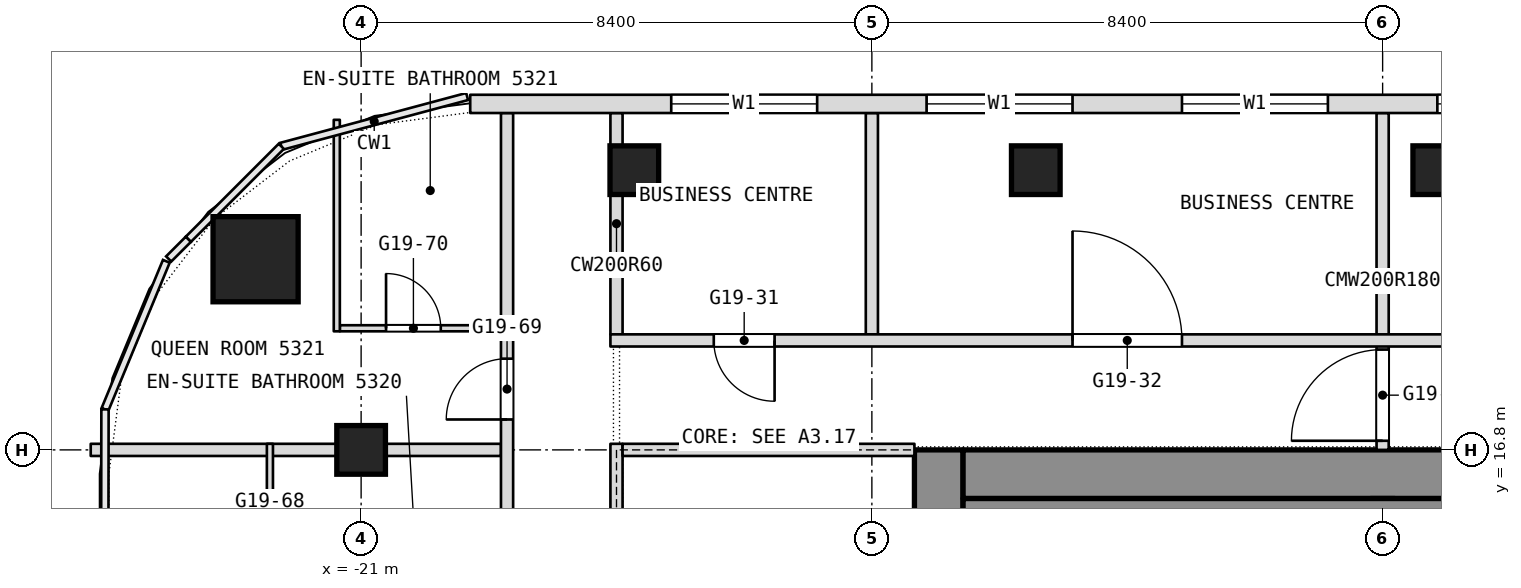
"""IFC4 building model, lengths in metres.
Left out: names, types, materials, properties, quantities, classifications, styles, units other than length and angle.
Written with IfcOpenShell. Run it as: python <this file> out.ifc"""

import sys

from ifc_helpers import new_model, si_unit, direction, frame, frame_2d, origin, origin_2d, place, context, subcontext, project, spatial, rectangle, extrude, element, fill, save


model = new_model("IFC4")
c1 = context("Model", 3, precision=1e-05, world=origin(), true_north=direction((0.0, 1.0)))
c2 = subcontext(c1, "Body", "Model", "MODEL_VIEW")
j1 = project(units=[si_unit("LENGTHUNIT", "METRE"), si_unit("PLANEANGLEUNIT", "RADIAN")], contexts=[c1])
p1 = place(None, origin())
s1 = spatial("IfcSite", under=j1, at=p1, CompositionType="ELEMENT")
p2 = place(p1, origin())
s2 = spatial("IfcBuilding", under=s1, at=p2, CompositionType="ELEMENT")
p3 = place(p2, frame((0.0, 0.0, 227.3)))
s3 = spatial("IfcBuildingStorey", under=s2, at=p3, CompositionType="ELEMENT", Elevation=227.3)
p4 = place(p3, frame((-11.5, 0.0, 0.0), z_axis=(0.0, 0.0, 1.0), x_axis=(0.0, 1.0, 0.0)))
e1 = element("IfcWall", 1, at=p4, inside=s3, PredefinedType="SHEAR", context=c2, shape_type="SweptSolid", body=[
    extrude(rectangle(XDim=16.8, YDim=0.8, at=frame_2d((8.4, 0.0))), origin(), (0.0, 0.0, 1.0), 3.6),
])
p5 = place(p4, frame((1.688, 0.0, 0.0)))
e2 = element("IfcOpeningElement", 2, at=p5, cuts=e1, PredefinedType="OPENING", context=c2, shape_type="SweptSolid", body=[
    extrude(rectangle(XDim=0.9, YDim=2.1, at=frame_2d((0.45, 1.05))), frame((0.0, 0.4, 0.0), z_axis=(0.0, -1.0, 0.0), x_axis=(1.0, 0.0, 0.0)), (0.0, 0.0, 1.0), 0.8),
])
p6 = place(p4, frame((4.312, 0.0, 0.0)))
e3 = element("IfcOpeningElement", 3, at=p6, cuts=e1, PredefinedType="OPENING", context=c2, shape_type="SweptSolid", body=[
    extrude(rectangle(XDim=0.9, YDim=2.1, at=frame_2d((0.45, 1.05))), frame((0.0, 0.4, 0.0), z_axis=(0.0, -1.0, 0.0), x_axis=(1.0, 0.0, 0.0)), (0.0, 0.0, 1.0), 0.8),
])
p7 = place(p4, frame((6.825, 0.0, 0.0)))
e4 = element("IfcOpeningElement", 4, at=p7, cuts=e1, PredefinedType="OPENING", context=c2, shape_type="SweptSolid", body=[
    extrude(rectangle(XDim=1.2, YDim=2.1, at=frame_2d((0.6, 1.05))), frame((0.0, 0.4, 0.0), z_axis=(0.0, -1.0, 0.0), x_axis=(1.0, 0.0, 0.0)), (0.0, 0.0, 1.0), 0.8),
])
p8 = place(p4, frame((12.3, 0.0, 0.0)))
e5 = element("IfcOpeningElement", 5, at=p8, cuts=e1, PredefinedType="OPENING", context=c2, shape_type="SweptSolid", body=[
    extrude(rectangle(XDim=0.9, YDim=2.1, at=frame_2d((0.45, 1.05))), frame((0.0, 0.4, 0.0), z_axis=(0.0, -1.0, 0.0), x_axis=(1.0, 0.0, 0.0)), (0.0, 0.0, 1.0), 0.8),
])
p9 = place(p4, frame((8.775, 0.0, 0.0)))
e6 = element("IfcOpeningElement", 6, at=p9, cuts=e1, PredefinedType="OPENING", context=c2, shape_type="SweptSolid", body=[
    extrude(rectangle(XDim=1.2, YDim=2.1, at=frame_2d((0.6, 1.05))), frame((0.0, 0.4, 0.0), z_axis=(0.0, -1.0, 0.0), x_axis=(1.0, 0.0, 0.0)), (0.0, 0.0, 1.0), 0.8),
])
p10 = place(p3, frame((-11.1, 16.4, 0.0), z_axis=(0.0, 0.0, 1.0), x_axis=(1.0, 0.0, 0.0)))
e7 = element("IfcWall", 7, at=p10, inside=s3, PredefinedType="SHEAR", context=c2, shape_type="SweptSolid", body=[
    extrude(rectangle(XDim=22.2, YDim=0.8, at=frame_2d((11.1, 0.0))), origin(), (0.0, 0.0, 1.0), 3.6),
])
p11 = place(p3, frame((-4.2, 0.8, 0.0), z_axis=(0.0, 0.0, 1.0), x_axis=(0.0, 1.0, 0.0)))
e8 = element("IfcWall", 8, at=p11, inside=s3, PredefinedType="SHEAR", context=c2, shape_type="SweptSolid", body=[
    extrude(rectangle(XDim=15.2, YDim=0.4, at=frame_2d((7.6, 0.0))), origin(), (0.0, 0.0, 1.0), 3.6),
])
p12 = place(p11, frame((8.5, 0.0, 0.0)))
e9 = element("IfcOpeningElement", 9, at=p12, cuts=e8, PredefinedType="OPENING", context=c2, shape_type="SweptSolid", body=[
    extrude(rectangle(XDim=1.2, YDim=2.1, at=frame_2d((0.6, 1.05))), frame((0.0, 0.2, 0.0), z_axis=(0.0, -1.0, 0.0), x_axis=(1.0, 0.0, 0.0)), (0.0, 0.0, 1.0), 0.4),
])
p13 = place(p3, frame((-22.736, 19.936, 0.0), z_axis=(0.0, 0.0, 1.0), x_axis=(1.0, 0.0, 0.0)))
e10 = element("IfcColumn", 10, at=p13, inside=s3, PredefinedType="COLUMN", context=c2, shape_type="SweptSolid", body=[
    extrude(rectangle(XDim=1.4, YDim=1.4, at=origin_2d()), origin(), (0.0, 0.0, 1.0), 3.6),
])
for number, where, z_axis, x_axis in (
    (11, (-21.0, 16.8, 0.0), (0.0, 0.0, 1.0), (1.0, 0.0, 0.0)),
    (12, (-16.507, 21.4, 0.0), (0.0, 0.0, 1.0), (1.0, 0.0, 0.0)),
    (13, (-9.904, 21.4, 0.0), (0.0, 0.0, 1.0), (1.0, 0.0, 0.0)),
    (14, (-3.302, 21.4, 0.0), (0.0, 0.0, 1.0), (1.0, 0.0, 0.0)),
):
    element("IfcColumn", number, at=place(p3, frame(where, z_axis=z_axis, x_axis=x_axis)), inside=s3, PredefinedType="COLUMN", context=c2, shape_type="SweptSolid", body=[
        extrude(rectangle(XDim=0.8, YDim=0.8, at=origin_2d()), origin(), (0.0, 0.0, 1.0), 3.6),
    ])
p14 = place(p3, frame((-4.2, 16.8, 0.0), z_axis=(0.0, 0.0, 1.0), x_axis=(0.0, 1.0, 0.0)))
e15 = element("IfcWall", 15, at=p14, inside=s3, PredefinedType="PARTITIONING", context=c2, shape_type="SweptSolid", body=[
    extrude(rectangle(XDim=5.54, YDim=0.2, at=frame_2d((2.77, 0.0))), origin(), (0.0, 0.0, 1.0), 3.34),
])
p15 = place(p14, frame((0.15, 0.0, 0.0)))
e16 = element("IfcOpeningElement", 16, at=p15, cuts=e15, PredefinedType="OPENING", context=c2, shape_type="SweptSolid", body=[
    extrude(rectangle(XDim=1.5, YDim=2.1, at=frame_2d((0.75, 1.05))), frame((0.0, 0.1, 0.0), z_axis=(0.0, -1.0, 0.0), x_axis=(1.0, 0.0, 0.0)), (0.0, 0.0, 1.0), 0.2),
])
for number, where, z_axis, x_axis in (
    (17, (-12.6, 18.7, 0.0), (0.0, 0.0, 1.0), (0.0, 1.0, 0.0)),
    (18, (-16.8, 18.7, 0.0), (0.0, 0.0, 1.0), (0.0, 1.0, 0.0)),
):
    element("IfcWall", number, at=place(p3, frame(where, z_axis=z_axis, x_axis=x_axis)), inside=s3, PredefinedType="PARTITIONING", context=c2, shape_type="SweptSolid", body=[
        extrude(rectangle(XDim=3.64, YDim=0.2, at=frame_2d((1.82, 0.0))), origin(), (0.0, 0.0, 1.0), 3.34),
    ])
p16 = place(p3, frame((-25.447, 16.8, 0.0), z_axis=(0.0, 0.0, 1.0), x_axis=(1.0, 0.0, 0.0)))
e19 = element("IfcWall", 19, at=p16, inside=s3, PredefinedType="PARTITIONING", context=c2, shape_type="SweptSolid", body=[
    extrude(rectangle(XDim=6.747, YDim=0.2, at=frame_2d((3.374, 0.0))), origin(), (0.0, 0.0, 1.0), 2.94),
])
p17 = place(p3, frame((-18.6, -26.751, 0.0), z_axis=(0.0, 0.0, 1.0), x_axis=(0.0, 1.0, 0.0)))
e20 = element("IfcWall", 20, at=p17, inside=s3, PredefinedType="PARTITIONING", context=c2, shape_type="SweptSolid", body=[
    extrude(rectangle(XDim=49.091, YDim=0.2, at=frame_2d((24.545, 0.0))), origin(), (0.0, 0.0, 1.0), 3.34),
])
p18 = place(p17, frame((3.413, 0.0, 0.0)))
e21 = element("IfcOpeningElement", 21, at=p18, cuts=e20, PredefinedType="OPENING", context=c2, shape_type="SweptSolid", body=[
    extrude(rectangle(XDim=1.0, YDim=2.1, at=frame_2d((0.5, 1.05))), frame((0.0, 0.1, 0.0), z_axis=(0.0, -1.0, 0.0), x_axis=(1.0, 0.0, 0.0)), (0.0, 0.0, 1.0), 0.2),
])
p19 = place(p17, frame((5.838, 0.0, 0.0)))
e22 = element("IfcOpeningElement", 22, at=p19, cuts=e20, PredefinedType="OPENING", context=c2, shape_type="SweptSolid", body=[
    extrude(rectangle(XDim=1.0, YDim=2.1, at=frame_2d((0.5, 1.05))), frame((0.0, 0.1, 0.0), z_axis=(0.0, -1.0, 0.0), x_axis=(1.0, 0.0, 0.0)), (0.0, 0.0, 1.0), 0.2),
])
p20 = place(p17, frame((10.351, 0.0, 0.0)))
e23 = element("IfcOpeningElement", 23, at=p20, cuts=e20, PredefinedType="OPENING", context=c2, shape_type="SweptSolid", body=[
    extrude(rectangle(XDim=1.0, YDim=2.1, at=frame_2d((0.5, 1.05))), frame((0.0, 0.1, 0.0), z_axis=(0.0, -1.0, 0.0), x_axis=(1.0, 0.0, 0.0)), (0.0, 0.0, 1.0), 0.2),
])
p21 = place(p17, frame((16.951, 0.0, 0.0)))
e24 = element("IfcOpeningElement", 24, at=p21, cuts=e20, PredefinedType="OPENING", context=c2, shape_type="SweptSolid", body=[
    extrude(rectangle(XDim=1.0, YDim=2.1, at=frame_2d((0.5, 1.05))), frame((0.0, 0.1, 0.0), z_axis=(0.0, -1.0, 0.0), x_axis=(1.0, 0.0, 0.0)), (0.0, 0.0, 1.0), 0.2),
])
p22 = place(p17, frame((21.151, 0.0, 0.0)))
e25 = element("IfcOpeningElement", 25, at=p22, cuts=e20, PredefinedType="OPENING", context=c2, shape_type="SweptSolid", body=[
    extrude(rectangle(XDim=1.0, YDim=2.1, at=frame_2d((0.5, 1.05))), frame((0.0, 0.1, 0.0), z_axis=(0.0, -1.0, 0.0), x_axis=(1.0, 0.0, 0.0)), (0.0, 0.0, 1.0), 0.2),
])
p23 = place(p17, frame((22.951, 0.0, 0.0)))
e26 = element("IfcOpeningElement", 26, at=p23, cuts=e20, PredefinedType="OPENING", context=c2, shape_type="SweptSolid", body=[
    extrude(rectangle(XDim=1.0, YDim=2.1, at=frame_2d((0.5, 1.05))), frame((0.0, 0.1, 0.0), z_axis=(0.0, -1.0, 0.0), x_axis=(1.0, 0.0, 0.0)), (0.0, 0.0, 1.0), 0.2),
])
p24 = place(p17, frame((30.351, 0.0, 0.0)))
e27 = element("IfcOpeningElement", 27, at=p24, cuts=e20, PredefinedType="OPENING", context=c2, shape_type="SweptSolid", body=[
    extrude(rectangle(XDim=1.1, YDim=2.1, at=frame_2d((0.55, 1.05))), frame((0.0, 0.1, 0.0), z_axis=(0.0, -1.0, 0.0), x_axis=(1.0, 0.0, 0.0)), (0.0, 0.0, 1.0), 0.2),
])
p25 = place(p17, frame((37.951, 0.0, 0.0)))
e28 = element("IfcOpeningElement", 28, at=p25, cuts=e20, PredefinedType="OPENING", context=c2, shape_type="SweptSolid", body=[
    extrude(rectangle(XDim=1.0, YDim=2.1, at=frame_2d((0.5, 1.05))), frame((0.0, 0.1, 0.0), z_axis=(0.0, -1.0, 0.0), x_axis=(1.0, 0.0, 0.0)), (0.0, 0.0, 1.0), 0.2),
])
p26 = place(p17, frame((39.751, 0.0, 0.0)))
e29 = element("IfcOpeningElement", 29, at=p26, cuts=e20, PredefinedType="OPENING", context=c2, shape_type="SweptSolid", body=[
    extrude(rectangle(XDim=1.0, YDim=2.1, at=frame_2d((0.5, 1.05))), frame((0.0, 0.1, 0.0), z_axis=(0.0, -1.0, 0.0), x_axis=(1.0, 0.0, 0.0)), (0.0, 0.0, 1.0), 0.2),
])
p27 = place(p17, frame((44.051, 0.0, 0.0)))
e30 = element("IfcOpeningElement", 30, at=p27, cuts=e20, PredefinedType="OPENING", context=c2, shape_type="SweptSolid", body=[
    extrude(rectangle(XDim=1.0, YDim=2.1, at=frame_2d((0.5, 1.05))), frame((0.0, 0.1, 0.0), z_axis=(0.0, -1.0, 0.0), x_axis=(1.0, 0.0, 0.0)), (0.0, 0.0, 1.0), 0.2),
])
p28 = place(p3, frame((-16.9, 18.6, 0.0), z_axis=(0.0, 0.0, 1.0), x_axis=(1.0, 0.0, 0.0)))
e31 = element("IfcWall", 31, at=p28, inside=s3, PredefinedType="PARTITIONING", context=c2, shape_type="SweptSolid", body=[
    extrude(rectangle(XDim=33.8, YDim=0.2, at=frame_2d((16.9, 0.0))), origin(), (0.0, 0.0, 1.0), 3.34),
])
p29 = place(p28, frame((1.7, 0.0, 0.0)))
e32 = element("IfcOpeningElement", 32, at=p29, cuts=e31, PredefinedType="OPENING", context=c2, shape_type="SweptSolid", body=[
    extrude(rectangle(XDim=1.0, YDim=2.1, at=frame_2d((0.5, 1.05))), frame((0.0, 0.1, 0.0), z_axis=(0.0, -1.0, 0.0), x_axis=(1.0, 0.0, 0.0)), (0.0, 0.0, 1.0), 0.2),
])
p30 = place(p28, frame((7.6, 0.0, 0.0)))
e33 = element("IfcOpeningElement", 33, at=p30, cuts=e31, PredefinedType="OPENING", context=c2, shape_type="SweptSolid", body=[
    extrude(rectangle(XDim=1.8, YDim=2.1, at=frame_2d((0.9, 1.05))), frame((0.0, 0.1, 0.0), z_axis=(0.0, -1.0, 0.0), x_axis=(1.0, 0.0, 0.0)), (0.0, 0.0, 1.0), 0.2),
])
p31 = place(p28, frame((16.0, 0.0, 0.0)))
e34 = element("IfcOpeningElement", 34, at=p31, cuts=e31, PredefinedType="OPENING", context=c2, shape_type="SweptSolid", body=[
    extrude(rectangle(XDim=1.8, YDim=2.1, at=frame_2d((0.9, 1.05))), frame((0.0, 0.1, 0.0), z_axis=(0.0, -1.0, 0.0), x_axis=(1.0, 0.0, 0.0)), (0.0, 0.0, 1.0), 0.2),
])
p32 = place(p28, frame((24.4, 0.0, 0.0)))
e35 = element("IfcOpeningElement", 35, at=p32, cuts=e31, PredefinedType="OPENING", context=c2, shape_type="SweptSolid", body=[
    extrude(rectangle(XDim=1.8, YDim=2.1, at=frame_2d((0.9, 1.05))), frame((0.0, 0.1, 0.0), z_axis=(0.0, -1.0, 0.0), x_axis=(1.0, 0.0, 0.0)), (0.0, 0.0, 1.0), 0.2),
])
p33 = place(p28, frame((31.1, 0.0, 0.0)))
e36 = element("IfcOpeningElement", 36, at=p33, cuts=e31, PredefinedType="OPENING", context=c2, shape_type="SweptSolid", body=[
    extrude(rectangle(XDim=1.0, YDim=2.1, at=frame_2d((0.5, 1.05))), frame((0.0, 0.1, 0.0), z_axis=(0.0, -1.0, 0.0), x_axis=(1.0, 0.0, 0.0)), (0.0, 0.0, 1.0), 0.2),
])
p34 = place(p3, frame((-21.35, 18.8, 0.0), z_axis=(0.0, 0.0, 1.0), x_axis=(1.0, 0.0, 0.0)))
e37 = element("IfcWall", 37, at=p34, inside=s3, PredefinedType="PARTITIONING", context=c2, shape_type="SweptSolid", body=[
    extrude(rectangle(XDim=2.65, YDim=0.1, at=frame_2d((1.325, 0.0))), origin(), (0.0, 0.0, 1.0), 3.34),
])
p35 = place(p34, frame((0.76, 0.0, 0.0)))
e38 = element("IfcOpeningElement", 38, at=p35, cuts=e37, PredefinedType="OPENING", context=c2, shape_type="SweptSolid", body=[
    extrude(rectangle(XDim=0.9, YDim=2.1, at=frame_2d((0.45, 1.05))), frame((0.0, 0.05, 0.0), z_axis=(0.0, -1.0, 0.0), x_axis=(1.0, 0.0, 0.0)), (0.0, 0.0, 1.0), 0.1),
])
p36 = place(p3, frame((-21.4, 18.75, 0.0), z_axis=(0.0, 0.0, 1.0), x_axis=(0.0, 1.0, 0.0)))
e39 = element("IfcWall", 39, at=p36, inside=s3, PredefinedType="PARTITIONING", context=c2, shape_type="SweptSolid", body=[
    extrude(rectangle(XDim=3.478, YDim=0.1, at=frame_2d((1.739, 0.0))), origin(), (0.0, 0.0, 1.0), 3.34),
])
p37 = place(p3, frame((-22.5, 14.35, 0.0), z_axis=(0.0, 0.0, 1.0), x_axis=(0.0, 1.0, 0.0)))
e40 = element("IfcWall", 40, at=p37, inside=s3, PredefinedType="PARTITIONING", context=c2, shape_type="SweptSolid", body=[
    extrude(rectangle(XDim=2.55, YDim=0.1, at=frame_2d((1.275, 0.0))), origin(), (0.0, 0.0, 1.0), 3.34),
])
p38 = place(p37, frame((0.15, 0.0, 0.0)))
e41 = element("IfcOpeningElement", 41, at=p38, cuts=e40, PredefinedType="OPENING", context=c2, shape_type="SweptSolid", body=[
    extrude(rectangle(XDim=0.9, YDim=2.1, at=frame_2d((0.45, 1.05))), frame((0.0, 0.05, 0.0), z_axis=(0.0, -1.0, 0.0), x_axis=(1.0, 0.0, 0.0)), (0.0, 0.0, 1.0), 0.1),
])
p39 = place(p3, frame((19.206, 22.49, 0.0), z_axis=(0.0, 0.0, 1.0), x_axis=(-1.0, 0.0, 0.0)))
e42 = element("IfcWall", 42, at=p39, inside=s3, PredefinedType="NOTDEFINED", context=c2, shape_type="SweptSolid", body=[
    extrude(rectangle(XDim=38.412, YDim=0.3, at=frame_2d((19.206, 0.0))), origin(), (0.0, 0.0, 1.0), 3.6),
])
p40 = place(p39, frame((3.306, 0.0, 0.9)))
e43 = element("IfcOpeningElement", 43, at=p40, cuts=e42, PredefinedType="OPENING", context=c2, shape_type="SweptSolid", body=[
    extrude(rectangle(XDim=2.4, YDim=2.1, at=frame_2d((1.2, 1.05))), frame((0.0, 0.15, 0.0), z_axis=(0.0, -1.0, 0.0), x_axis=(1.0, 0.0, 0.0)), (0.0, 0.0, 1.0), 0.3),
])
p41 = place(p39, frame((7.506, 0.0, 0.9)))
e44 = element("IfcOpeningElement", 44, at=p41, cuts=e42, PredefinedType="OPENING", context=c2, shape_type="SweptSolid", body=[
    extrude(rectangle(XDim=2.4, YDim=2.1, at=frame_2d((1.2, 1.05))), frame((0.0, 0.15, 0.0), z_axis=(0.0, -1.0, 0.0), x_axis=(1.0, 0.0, 0.0)), (0.0, 0.0, 1.0), 0.3),
])
p42 = place(p39, frame((11.706, 0.0, 0.9)))
e45 = element("IfcOpeningElement", 45, at=p42, cuts=e42, PredefinedType="OPENING", context=c2, shape_type="SweptSolid", body=[
    extrude(rectangle(XDim=2.4, YDim=2.1, at=frame_2d((1.2, 1.05))), frame((0.0, 0.15, 0.0), z_axis=(0.0, -1.0, 0.0), x_axis=(1.0, 0.0, 0.0)), (0.0, 0.0, 1.0), 0.3),
])
p43 = place(p39, frame((15.906, 0.0, 0.9)))
e46 = element("IfcOpeningElement", 46, at=p43, cuts=e42, PredefinedType="OPENING", context=c2, shape_type="SweptSolid", body=[
    extrude(rectangle(XDim=2.4, YDim=2.1, at=frame_2d((1.2, 1.05))), frame((0.0, 0.15, 0.0), z_axis=(0.0, -1.0, 0.0), x_axis=(1.0, 0.0, 0.0)), (0.0, 0.0, 1.0), 0.3),
])
p44 = place(p39, frame((20.106, 0.0, 0.9)))
e47 = element("IfcOpeningElement", 47, at=p44, cuts=e42, PredefinedType="OPENING", context=c2, shape_type="SweptSolid", body=[
    extrude(rectangle(XDim=2.4, YDim=2.1, at=frame_2d((1.2, 1.05))), frame((0.0, 0.15, 0.0), z_axis=(0.0, -1.0, 0.0), x_axis=(1.0, 0.0, 0.0)), (0.0, 0.0, 1.0), 0.3),
])
p45 = place(p39, frame((24.306, 0.0, 0.9)))
e48 = element("IfcOpeningElement", 48, at=p45, cuts=e42, PredefinedType="OPENING", context=c2, shape_type="SweptSolid", body=[
    extrude(rectangle(XDim=2.4, YDim=2.1, at=frame_2d((1.2, 1.05))), frame((0.0, 0.15, 0.0), z_axis=(0.0, -1.0, 0.0), x_axis=(1.0, 0.0, 0.0)), (0.0, 0.0, 1.0), 0.3),
])
p46 = place(p39, frame((28.506, 0.0, 0.9)))
e49 = element("IfcOpeningElement", 49, at=p46, cuts=e42, PredefinedType="OPENING", context=c2, shape_type="SweptSolid", body=[
    extrude(rectangle(XDim=2.4, YDim=2.1, at=frame_2d((1.2, 1.05))), frame((0.0, 0.15, 0.0), z_axis=(0.0, -1.0, 0.0), x_axis=(1.0, 0.0, 0.0)), (0.0, 0.0, 1.0), 0.3),
])
p47 = place(p39, frame((32.706, 0.0, 0.9)))
e50 = element("IfcOpeningElement", 50, at=p47, cuts=e42, PredefinedType="OPENING", context=c2, shape_type="SweptSolid", body=[
    extrude(rectangle(XDim=2.4, YDim=2.1, at=frame_2d((1.2, 1.05))), frame((0.0, 0.15, 0.0), z_axis=(0.0, -1.0, 0.0), x_axis=(1.0, 0.0, 0.0)), (0.0, 0.0, 1.0), 0.3),
])
p48 = place(p3, frame((-11.1, 15.65, 0.0), z_axis=(0.0, 0.0, 1.0), x_axis=(1.0, 0.0, 0.0)))
e51 = element("IfcWall", 51, at=p48, inside=s3, PredefinedType="PARTITIONING", context=c2, shape_type="SweptSolid", body=[
    extrude(rectangle(XDim=22.2, YDim=0.7, at=frame_2d((11.1, 0.0))), origin(), (0.0, 0.0, 1.0), 3.34),
])
p49 = place(p3, frame((-16.8, -0.1, 0.0), z_axis=(0.0, 0.0, 1.0), x_axis=(0.0, 1.0, 0.0)))
e52 = element("IfcWall", 52, at=p49, inside=s3, PredefinedType="PARTITIONING", context=c2, shape_type="SweptSolid", body=[
    extrude(rectangle(XDim=17.0, YDim=0.2, at=frame_2d((8.5, 0.0))), origin(), (0.0, 0.0, 1.0), 3.34),
])
p50 = place(p49, frame((2.2, 0.0, 0.0)))
e53 = element("IfcOpeningElement", 53, at=p50, cuts=e52, PredefinedType="OPENING", context=c2, shape_type="SweptSolid", body=[
    extrude(rectangle(XDim=1.8, YDim=2.1, at=frame_2d((0.9, 1.05))), frame((0.0, 0.1, 0.0), z_axis=(0.0, -1.0, 0.0), x_axis=(1.0, 0.0, 0.0)), (0.0, 0.0, 1.0), 0.2),
])
p51 = place(p49, frame((13.0, 0.0, 0.0)))
e54 = element("IfcOpeningElement", 54, at=p51, cuts=e52, PredefinedType="OPENING", context=c2, shape_type="SweptSolid", body=[
    extrude(rectangle(XDim=1.8, YDim=2.1, at=frame_2d((0.9, 1.05))), frame((0.0, 0.1, 0.0), z_axis=(0.0, -1.0, 0.0), x_axis=(1.0, 0.0, 0.0)), (0.0, 0.0, 1.0), 0.2),
])
p52 = place(p3, frame((-16.7, 16.8, 0.0), z_axis=(0.0, 0.0, 1.0), x_axis=(1.0, 0.0, 0.0)))
e55 = element("IfcWall", 55, at=p52, inside=s3, PredefinedType="PARTITIONING", context=c2, shape_type="SweptSolid", body=[
    extrude(rectangle(XDim=4.8, YDim=0.2, at=frame_2d((2.4, 0.0))), origin(), (0.0, 0.0, 1.0), 2.94),
])
p53 = place(p27, origin())
e56 = element("IfcDoor", 56, at=p53, inside=s3, OperationType="SINGLE_SWING_RIGHT", PredefinedType="DOOR", context=c2, shape_type="SweptSolid", body=[
    extrude(rectangle(XDim=1.0, YDim=2.1, at=frame_2d((0.5, 1.05))), frame((0.0, 0.025, 0.0), z_axis=(0.0, -1.0, 0.0), x_axis=(1.0, 0.0, 0.0)), (0.0, 0.0, 1.0), 0.05),
])
fill(e30, e56)
p54 = place(p29, origin())
e57 = element("IfcDoor", 57, at=p54, inside=s3, OperationType="SINGLE_SWING_LEFT", PredefinedType="DOOR", context=c2, shape_type="SweptSolid", body=[
    extrude(rectangle(XDim=1.0, YDim=2.1, at=frame_2d((0.5, 1.05))), frame((0.0, 0.025, 0.0), z_axis=(0.0, -1.0, 0.0), x_axis=(1.0, 0.0, 0.0)), (0.0, 0.0, 1.0), 0.05),
])
fill(e32, e57)
p55 = place(p30, origin())
e58 = element("IfcDoor", 58, at=p55, inside=s3, OperationType="DOUBLE_DOOR_SINGLE_SWING", PredefinedType="DOOR", context=c2, shape_type="SweptSolid", body=[
    extrude(rectangle(XDim=1.8, YDim=2.1, at=frame_2d((0.9, 1.05))), frame((0.0, 0.025, 0.0), z_axis=(0.0, -1.0, 0.0), x_axis=(1.0, 0.0, 0.0)), (0.0, 0.0, 1.0), 0.05),
])
fill(e33, e58)
p56 = place(p35, origin())
e59 = element("IfcDoor", 59, at=p56, inside=s3, OperationType="SINGLE_SWING_LEFT", PredefinedType="DOOR", context=c2, shape_type="SweptSolid", body=[
    extrude(rectangle(XDim=0.9, YDim=2.1, at=frame_2d((0.45, 1.05))), frame((0.0, 0.025, 0.0), z_axis=(0.0, -1.0, 0.0), x_axis=(1.0, 0.0, 0.0)), (0.0, 0.0, 1.0), 0.05),
])
fill(e38, e59)
p57 = place(p44, origin())
e60 = element("IfcWindow", 60, at=p57, inside=s3, PartitioningType="SINGLE_PANEL", PredefinedType="WINDOW", context=c2, shape_type="SweptSolid", body=[
    extrude(rectangle(XDim=2.4, YDim=2.1, at=frame_2d((1.2, 1.05))), frame((0.0, 0.03, 0.0), z_axis=(0.0, -1.0, 0.0), x_axis=(1.0, 0.0, 0.0)), (0.0, 0.0, 1.0), 0.06),
])
fill(e47, e60)
p58 = place(p45, origin())
e61 = element("IfcWindow", 61, at=p58, inside=s3, PartitioningType="SINGLE_PANEL", PredefinedType="WINDOW", context=c2, shape_type="SweptSolid", body=[
    extrude(rectangle(XDim=2.4, YDim=2.1, at=frame_2d((1.2, 1.05))), frame((0.0, 0.03, 0.0), z_axis=(0.0, -1.0, 0.0), x_axis=(1.0, 0.0, 0.0)), (0.0, 0.0, 1.0), 0.06),
])
fill(e48, e61)
p59 = place(p46, origin())
e62 = element("IfcWindow", 62, at=p59, inside=s3, PartitioningType="SINGLE_PANEL", PredefinedType="WINDOW", context=c2, shape_type="SweptSolid", body=[
    extrude(rectangle(XDim=2.4, YDim=2.1, at=frame_2d((1.2, 1.05))), frame((0.0, 0.03, 0.0), z_axis=(0.0, -1.0, 0.0), x_axis=(1.0, 0.0, 0.0)), (0.0, 0.0, 1.0), 0.06),
])
fill(e49, e62)
p60 = place(p47, origin())
e63 = element("IfcWindow", 63, at=p60, inside=s3, PartitioningType="SINGLE_PANEL", PredefinedType="WINDOW", context=c2, shape_type="SweptSolid", body=[
    extrude(rectangle(XDim=2.4, YDim=2.1, at=frame_2d((1.2, 1.05))), frame((0.0, 0.03, 0.0), z_axis=(0.0, -1.0, 0.0), x_axis=(1.0, 0.0, 0.0)), (0.0, 0.0, 1.0), 0.06),
])
fill(e50, e63)
p61 = place(p15, origin())
e64 = element("IfcDoor", 64, at=p61, inside=s3, OperationType="DOUBLE_DOOR_DOUBLE_SWING", PredefinedType="DOOR", context=c2, shape_type="SweptSolid", body=[
    extrude(rectangle(XDim=1.5, YDim=2.1, at=frame_2d((0.75, 1.05))), frame((0.0, 0.025, 0.0), z_axis=(0.0, -1.0, 0.0), x_axis=(1.0, 0.0, 0.0)), (0.0, 0.0, 1.0), 0.05),
])
fill(e16, e64)
save(model, sys.argv[1])
